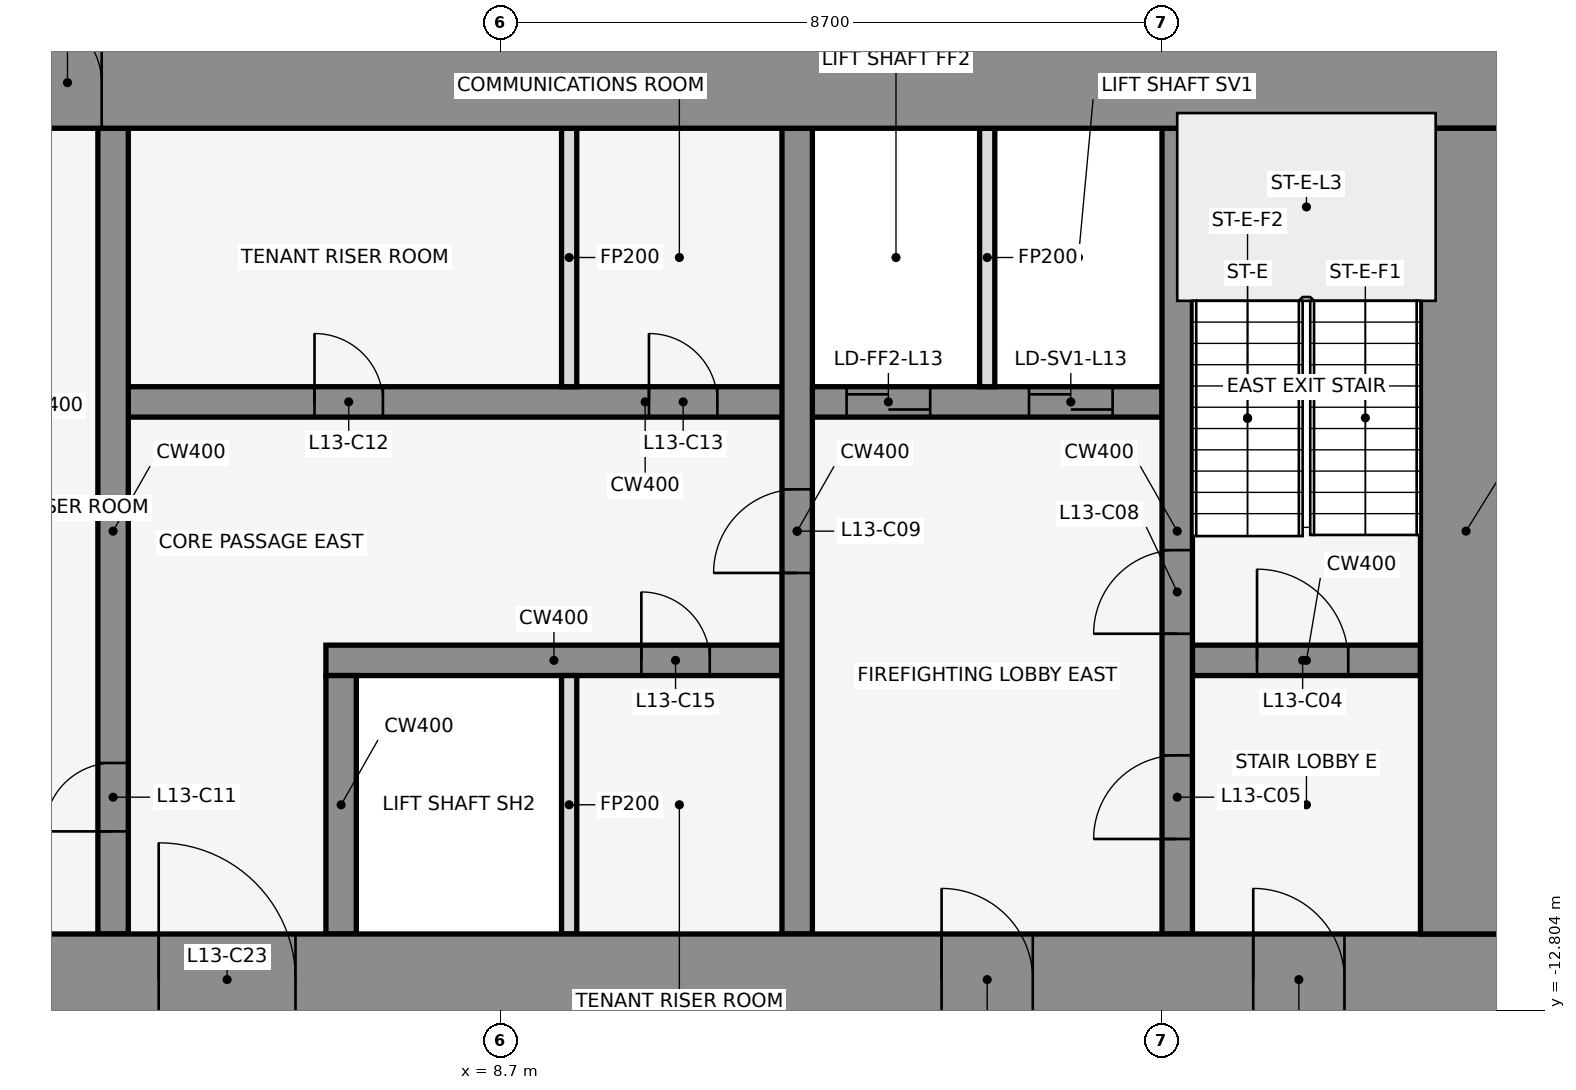
"""IFC4 building model, lengths in metres.
Left out: names, types, materials, properties, quantities, classifications, styles, units other than length and angle.
Written with IfcOpenShell. Run it as: python <this file> out.ifc"""

import sys

from ifc_helpers import new_model, si_unit, direction, frame, frame_2d, origin, place, context, subcontext, project, spatial, rectangle, extrude, element, fill, save


model = new_model("IFC4")
c1 = context("Model", 3, precision=1e-05, world=origin(), true_north=direction((0.0, 1.0)))
c2 = subcontext(c1, "Body", "Model", "MODEL_VIEW")
j1 = project(units=[si_unit("LENGTHUNIT", "METRE"), si_unit("PLANEANGLEUNIT", "RADIAN")], contexts=[c1])
p1 = place(None, origin())
s1 = spatial("IfcSite", under=j1, at=p1, CompositionType="ELEMENT")
p2 = place(p1, origin())
s2 = spatial("IfcBuilding", under=s1, at=p2, CompositionType="ELEMENT")
p3 = place(p2, frame((0.0, 0.0, 66.5)))
s3 = spatial("IfcBuildingStorey", under=s2, at=p3, CompositionType="ELEMENT", Elevation=66.5)
p4 = place(p3, frame((16.432, -0.105, 0.0), z_axis=(0.0, 0.0, 1.0), x_axis=(-0.83981312244, 0.542875602121, 0.0)))
e1 = element("IfcWall", 1, at=p4, inside=s3, PredefinedType="STANDARD", context=c2, shape_type="SweptSolid", body=[
    extrude(rectangle(XDim=2.183, YDim=0.25, at=frame_2d((1.091, 0.0))), origin(), (0.0, 0.0, 1.0), 4.35),
])
p5 = place(p3, frame((6.4, -8.2, 0.0), z_axis=(0.0, 0.0, 1.0), x_axis=(1.0, 0.0, 0.0)))
e2 = element("IfcWall", 2, at=p5, inside=s3, PredefinedType="SHEAR", context=c2, shape_type="SweptSolid", body=[
    extrude(rectangle(XDim=6.0, YDim=0.4, at=frame_2d((3.0, 0.0))), origin(), (0.0, 0.0, 1.0), 4.5),
])
p6 = place(p5, frame((4.15, 0.0, 0.0)))
e3 = element("IfcOpeningElement", 3, at=p6, cuts=e2, PredefinedType="OPENING", context=c2, shape_type="SweptSolid", body=[
    extrude(rectangle(XDim=0.9, YDim=2.1, at=frame_2d((0.45, 1.05))), frame((0.0, 0.212, 0.0), z_axis=(0.0, -1.0, 0.0), x_axis=(1.0, 0.0, 0.0)), (0.0, 0.0, 1.0), 0.424),
])
p7 = place(p3, frame((17.8, -8.2, 0.0), z_axis=(0.0, 0.0, 1.0), x_axis=(1.0, 0.0, 0.0)))
e4 = element("IfcWall", 4, at=p7, inside=s3, PredefinedType="SHEAR", context=c2, shape_type="SweptSolid", body=[
    extrude(rectangle(XDim=3.0, YDim=0.4, at=frame_2d((1.5, 0.0))), origin(), (0.0, 0.0, 1.0), 4.5),
])
p8 = place(p7, frame((0.85, 0.0, 0.0)))
e5 = element("IfcOpeningElement", 5, at=p8, cuts=e4, PredefinedType="OPENING", context=c2, shape_type="SweptSolid", body=[
    extrude(rectangle(XDim=1.2, YDim=2.1, at=frame_2d((0.6, 1.05))), frame((0.0, 0.212, 0.0), z_axis=(0.0, -1.0, 0.0), x_axis=(1.0, 0.0, 0.0)), (0.0, 0.0, 1.0), 0.424),
])
p9 = place(p3, frame((3.8, -4.8, 0.0), z_axis=(0.0, 0.0, 1.0), x_axis=(1.0, 0.0, 0.0)))
e6 = element("IfcWall", 6, at=p9, inside=s3, PredefinedType="SHEAR", context=c2, shape_type="SweptSolid", body=[
    extrude(rectangle(XDim=13.6, YDim=0.4, at=frame_2d((6.8, 0.0))), origin(), (0.0, 0.0, 1.0), 4.5),
])
p10 = place(p9, frame((9.45, 0.0, 0.0)))
e7 = element("IfcOpeningElement", 7, at=p10, cuts=e6, PredefinedType="OPENING", context=c2, shape_type="SweptSolid", body=[
    extrude(rectangle(XDim=1.1, YDim=2.1, at=frame_2d((0.55, 1.05))), frame((0.0, 0.212, 0.0), z_axis=(0.0, -1.0, 0.0), x_axis=(1.0, 0.0, 0.0)), (0.0, 0.0, 1.0), 0.424),
])
p11 = place(p9, frame((11.85, 0.0, 0.0)))
e8 = element("IfcOpeningElement", 8, at=p11, cuts=e6, PredefinedType="OPENING", context=c2, shape_type="SweptSolid", body=[
    extrude(rectangle(XDim=1.1, YDim=2.1, at=frame_2d((0.55, 1.05))), frame((0.0, 0.212, 0.0), z_axis=(0.0, -1.0, 0.0), x_axis=(1.0, 0.0, 0.0)), (0.0, 0.0, 1.0), 0.424),
])
p12 = place(p9, frame((2.45, 0.0, 0.0)))
e9 = element("IfcOpeningElement", 9, at=p12, cuts=e6, PredefinedType="OPENING", context=c2, shape_type="SweptSolid", body=[
    extrude(rectangle(XDim=0.9, YDim=2.1, at=frame_2d((0.45, 1.05))), frame((0.0, 0.212, 0.0), z_axis=(0.0, -1.0, 0.0), x_axis=(1.0, 0.0, 0.0)), (0.0, 0.0, 1.0), 0.424),
])
p13 = place(p9, frame((6.85, 0.0, 0.0)))
e10 = element("IfcOpeningElement", 10, at=p13, cuts=e6, PredefinedType="OPENING", context=c2, shape_type="SweptSolid", body=[
    extrude(rectangle(XDim=0.9, YDim=2.1, at=frame_2d((0.45, 1.05))), frame((0.0, 0.212, 0.0), z_axis=(0.0, -1.0, 0.0), x_axis=(1.0, 0.0, 0.0)), (0.0, 0.0, 1.0), 0.424),
])
p14 = place(p3, frame((3.6, -11.8, 0.0), z_axis=(0.0, 0.0, 1.0), x_axis=(0.0, 1.0, 0.0)))
e11 = element("IfcWall", 11, at=p14, inside=s3, PredefinedType="SHEAR", context=c2, shape_type="SweptSolid", body=[
    extrude(rectangle(XDim=10.6, YDim=0.4, at=frame_2d((5.3, 0.0))), origin(), (0.0, 0.0, 1.0), 4.5),
])
p15 = place(p14, frame((1.35, 0.0, 0.0)))
e12 = element("IfcOpeningElement", 12, at=p15, cuts=e11, PredefinedType="OPENING", context=c2, shape_type="SweptSolid", body=[
    extrude(rectangle(XDim=0.9, YDim=2.1, at=frame_2d((0.45, 1.05))), frame((0.0, 0.212, 0.0), z_axis=(0.0, -1.0, 0.0), x_axis=(1.0, 0.0, 0.0)), (0.0, 0.0, 1.0), 0.424),
])
p16 = place(p3, frame((6.6, -11.8, 0.0), z_axis=(0.0, 0.0, 1.0), x_axis=(0.0, 1.0, 0.0)))
e13 = element("IfcWall", 13, at=p16, inside=s3, PredefinedType="SHEAR", context=c2, shape_type="SweptSolid", body=[
    extrude(rectangle(XDim=3.4, YDim=0.4, at=frame_2d((1.7, 0.0))), origin(), (0.0, 0.0, 1.0), 4.5),
])
for number, where, z_axis, x_axis in (
    (14, (9.6, -11.8, 0.0), (0.0, 0.0, 1.0), (0.0, 1.0, 0.0)),
    (15, (9.6, -4.6, 0.0), (0.0, 0.0, 1.0), (0.0, 1.0, 0.0)),
):
    element("IfcWall", number, at=place(p3, frame(where, z_axis=z_axis, x_axis=x_axis)), inside=s3, PredefinedType="PARTITIONING", context=c2, shape_type="SweptSolid", body=[
        extrude(rectangle(XDim=3.4, YDim=0.2, at=frame_2d((1.7, 0.0))), origin(), (0.0, 0.0, 1.0), 3.418),
    ])
p17 = place(p3, frame((12.6, -11.8, 0.0), z_axis=(0.0, 0.0, 1.0), x_axis=(0.0, 1.0, 0.0)))
e16 = element("IfcWall", 16, at=p17, inside=s3, PredefinedType="SHEAR", context=c2, shape_type="SweptSolid", body=[
    extrude(rectangle(XDim=10.6, YDim=0.4, at=frame_2d((5.3, 0.0))), origin(), (0.0, 0.0, 1.0), 4.5),
])
p18 = place(p17, frame((4.75, 0.0, 0.0)))
e17 = element("IfcOpeningElement", 17, at=p18, cuts=e16, PredefinedType="OPENING", context=c2, shape_type="SweptSolid", body=[
    extrude(rectangle(XDim=1.1, YDim=2.1, at=frame_2d((0.55, 1.05))), frame((0.0, 0.212, 0.0), z_axis=(0.0, -1.0, 0.0), x_axis=(1.0, 0.0, 0.0)), (0.0, 0.0, 1.0), 0.424),
])
p19 = place(p3, frame((15.1, -4.6, 0.0), z_axis=(0.0, 0.0, 1.0), x_axis=(0.0, 1.0, 0.0)))
e18 = element("IfcWall", 18, at=p19, inside=s3, PredefinedType="PARTITIONING", context=c2, shape_type="SweptSolid", body=[
    extrude(rectangle(XDim=3.4, YDim=0.2, at=frame_2d((1.7, 0.0))), origin(), (0.0, 0.0, 1.0), 3.418),
])
p20 = place(p3, frame((17.6, -11.8, 0.0), z_axis=(0.0, 0.0, 1.0), x_axis=(0.0, 1.0, 0.0)))
e19 = element("IfcWall", 19, at=p20, inside=s3, PredefinedType="SHEAR", context=c2, shape_type="SweptSolid", body=[
    extrude(rectangle(XDim=10.6, YDim=0.4, at=frame_2d((5.3, 0.0))), origin(), (0.0, 0.0, 1.0), 4.5),
])
p21 = place(p20, frame((1.25, 0.0, 0.0)))
e20 = element("IfcOpeningElement", 20, at=p21, cuts=e19, PredefinedType="OPENING", context=c2, shape_type="SweptSolid", body=[
    extrude(rectangle(XDim=1.1, YDim=2.1, at=frame_2d((0.55, 1.05))), frame((0.0, 0.212, 0.0), z_axis=(0.0, -1.0, 0.0), x_axis=(1.0, 0.0, 0.0)), (0.0, 0.0, 1.0), 0.424),
])
p22 = place(p20, frame((3.95, 0.0, 0.0)))
e21 = element("IfcOpeningElement", 21, at=p22, cuts=e19, PredefinedType="OPENING", context=c2, shape_type="SweptSolid", body=[
    extrude(rectangle(XDim=1.1, YDim=2.1, at=frame_2d((0.55, 1.05))), frame((0.0, 0.212, 0.0), z_axis=(0.0, -1.0, 0.0), x_axis=(1.0, 0.0, 0.0)), (0.0, 0.0, 1.0), 0.424),
])
p23 = place(p3, frame((-22.0, -0.6, 0.0), z_axis=(0.0, 0.0, 1.0), x_axis=(1.0, 0.0, 0.0)))
e22 = element("IfcWall", 22, at=p23, inside=s3, PredefinedType="SHEAR", context=c2, shape_type="SweptSolid", body=[
    extrude(rectangle(XDim=44.0, YDim=1.2, at=frame_2d((22.0, 0.0))), origin(), (0.0, 0.0, 1.0), 4.5),
])
p24 = place(p23, frame((18.55, 0.0, 0.0)))
e23 = element("IfcOpeningElement", 23, at=p24, cuts=e22, PredefinedType="OPENING", context=c2, shape_type="SweptSolid", body=[
    extrude(rectangle(XDim=0.9, YDim=2.1, at=frame_2d((0.45, 1.05))), frame((0.0, 0.612, 0.0), z_axis=(0.0, -1.0, 0.0), x_axis=(1.0, 0.0, 0.0)), (0.0, 0.0, 1.0), 1.224),
])
p25 = place(p23, frame((24.55, 0.0, 0.0)))
e24 = element("IfcOpeningElement", 24, at=p25, cuts=e22, PredefinedType="OPENING", context=c2, shape_type="SweptSolid", body=[
    extrude(rectangle(XDim=0.9, YDim=2.1, at=frame_2d((0.45, 1.05))), frame((0.0, 0.612, 0.0), z_axis=(0.0, -1.0, 0.0), x_axis=(1.0, 0.0, 0.0)), (0.0, 0.0, 1.0), 1.224),
])
p26 = place(p3, frame((-22.0, -12.4, 0.0), z_axis=(0.0, 0.0, 1.0), x_axis=(1.0, 0.0, 0.0)))
e25 = element("IfcWall", 25, at=p26, inside=s3, PredefinedType="SHEAR", context=c2, shape_type="SweptSolid", body=[
    extrude(rectangle(XDim=44.0, YDim=1.2, at=frame_2d((22.0, 0.0))), origin(), (0.0, 0.0, 1.0), 4.5),
])
p27 = place(p26, frame((2.2, 0.0, 0.0)))
e26 = element("IfcOpeningElement", 26, at=p27, cuts=e25, PredefinedType="OPENING", context=c2, shape_type="SweptSolid", body=[
    extrude(rectangle(XDim=1.2, YDim=2.1, at=frame_2d((0.6, 1.05))), frame((0.0, 0.612, 0.0), z_axis=(0.0, -1.0, 0.0), x_axis=(1.0, 0.0, 0.0)), (0.0, 0.0, 1.0), 1.224),
])
p28 = place(p26, frame((21.4, 0.0, 0.0)))
e27 = element("IfcOpeningElement", 27, at=p28, cuts=e25, PredefinedType="OPENING", context=c2, shape_type="SweptSolid", body=[
    extrude(rectangle(XDim=1.2, YDim=2.1, at=frame_2d((0.6, 1.05))), frame((0.0, 0.612, 0.0), z_axis=(0.0, -1.0, 0.0), x_axis=(1.0, 0.0, 0.0)), (0.0, 0.0, 1.0), 1.224),
])
p29 = place(p26, frame((40.6, 0.0, 0.0)))
e28 = element("IfcOpeningElement", 28, at=p29, cuts=e25, PredefinedType="OPENING", context=c2, shape_type="SweptSolid", body=[
    extrude(rectangle(XDim=1.2, YDim=2.1, at=frame_2d((0.6, 1.05))), frame((0.0, 0.612, 0.0), z_axis=(0.0, -1.0, 0.0), x_axis=(1.0, 0.0, 0.0)), (0.0, 0.0, 1.0), 1.224),
])
p30 = place(p26, frame((16.0, 0.0, 0.0)))
e29 = element("IfcOpeningElement", 29, at=p30, cuts=e25, PredefinedType="OPENING", context=c2, shape_type="SweptSolid", body=[
    extrude(rectangle(XDim=1.8, YDim=2.1, at=frame_2d((0.9, 1.05))), frame((0.0, 0.612, 0.0), z_axis=(0.0, -1.0, 0.0), x_axis=(1.0, 0.0, 0.0)), (0.0, 0.0, 1.0), 1.224),
])
p31 = place(p26, frame((6.3, 0.0, 0.0)))
e30 = element("IfcOpeningElement", 30, at=p31, cuts=e25, PredefinedType="OPENING", context=c2, shape_type="SweptSolid", body=[
    extrude(rectangle(XDim=1.2, YDim=2.1, at=frame_2d((0.6, 1.05))), frame((0.0, 0.612, 0.0), z_axis=(0.0, -1.0, 0.0), x_axis=(1.0, 0.0, 0.0)), (0.0, 0.0, 1.0), 1.224),
])
p32 = place(p26, frame((26.2, 0.0, 0.0)))
e31 = element("IfcOpeningElement", 31, at=p32, cuts=e25, PredefinedType="OPENING", context=c2, shape_type="SweptSolid", body=[
    extrude(rectangle(XDim=1.8, YDim=2.1, at=frame_2d((0.9, 1.05))), frame((0.0, 0.612, 0.0), z_axis=(0.0, -1.0, 0.0), x_axis=(1.0, 0.0, 0.0)), (0.0, 0.0, 1.0), 1.224),
])
p33 = place(p26, frame((36.5, 0.0, 0.0)))
e32 = element("IfcOpeningElement", 32, at=p33, cuts=e25, PredefinedType="OPENING", context=c2, shape_type="SweptSolid", body=[
    extrude(rectangle(XDim=1.2, YDim=2.1, at=frame_2d((0.6, 1.05))), frame((0.0, 0.612, 0.0), z_axis=(0.0, -1.0, 0.0), x_axis=(1.0, 0.0, 0.0)), (0.0, 0.0, 1.0), 1.224),
])
p34 = place(p3, frame((21.4, -11.8, 0.0), z_axis=(0.0, 0.0, 1.0), x_axis=(0.0, 1.0, 0.0)))
e33 = element("IfcWall", 33, at=p34, inside=s3, PredefinedType="SHEAR", context=c2, shape_type="SweptSolid", body=[
    extrude(rectangle(XDim=10.6, YDim=1.2, at=frame_2d((5.3, 0.0))), origin(), (0.0, 0.0, 1.0), 4.5),
])
p35 = place(p8, origin())
e34 = element("IfcDoor", 34, at=p35, inside=s3, OperationType="SINGLE_SWING_RIGHT", PredefinedType="DOOR", context=c2, shape_type="SweptSolid", body=[
    extrude(rectangle(XDim=1.2, YDim=2.1, at=frame_2d((0.6, 1.05))), frame((0.0, 0.025, 0.0), z_axis=(0.0, -1.0, 0.0), x_axis=(1.0, 0.0, 0.0)), (0.0, 0.0, 1.0), 0.05),
])
fill(e5, e34)
p36 = place(p21, origin())
e35 = element("IfcDoor", 35, at=p36, inside=s3, OperationType="SINGLE_SWING_LEFT", PredefinedType="DOOR", context=c2, shape_type="SweptSolid", body=[
    extrude(rectangle(XDim=1.1, YDim=2.1, at=frame_2d((0.55, 1.05))), frame((0.0, 0.025, 0.0), z_axis=(0.0, -1.0, 0.0), x_axis=(1.0, 0.0, 0.0)), (0.0, 0.0, 1.0), 0.05),
])
fill(e20, e35)
p37 = place(p10, origin())
e36 = element("IfcDoor", 36, at=p37, inside=s3, OperationType="DOUBLE_DOOR_SLIDING", PredefinedType="DOOR", context=c2, shape_type="SweptSolid", body=[
    extrude(rectangle(XDim=1.1, YDim=2.1, at=frame_2d((0.55, 1.05))), frame((0.0, 0.025, 0.0), z_axis=(0.0, -1.0, 0.0), x_axis=(1.0, 0.0, 0.0)), (0.0, 0.0, 1.0), 0.05),
])
fill(e7, e36)
p38 = place(p11, origin())
e37 = element("IfcDoor", 37, at=p38, inside=s3, OperationType="DOUBLE_DOOR_SLIDING", PredefinedType="DOOR", context=c2, shape_type="SweptSolid", body=[
    extrude(rectangle(XDim=1.1, YDim=2.1, at=frame_2d((0.55, 1.05))), frame((0.0, 0.025, 0.0), z_axis=(0.0, -1.0, 0.0), x_axis=(1.0, 0.0, 0.0)), (0.0, 0.0, 1.0), 0.05),
])
fill(e8, e37)
p39 = place(p22, origin())
e38 = element("IfcDoor", 38, at=p39, inside=s3, OperationType="SINGLE_SWING_RIGHT", PredefinedType="DOOR", context=c2, shape_type="SweptSolid", body=[
    extrude(rectangle(XDim=1.1, YDim=2.1, at=frame_2d((0.55, 1.05))), frame((0.0, 0.025, 0.0), z_axis=(0.0, -1.0, 0.0), x_axis=(1.0, 0.0, 0.0)), (0.0, 0.0, 1.0), 0.05),
])
fill(e21, e38)
p40 = place(p18, frame((1.1, 0.0, 0.0), z_axis=(0.0, 0.0, 1.0), x_axis=(-1.0, 0.0, 0.0)))
e39 = element("IfcDoor", 39, at=p40, inside=s3, OperationType="SINGLE_SWING_RIGHT", PredefinedType="DOOR", context=c2, shape_type="SweptSolid", body=[
    extrude(rectangle(XDim=1.1, YDim=2.1, at=frame_2d((0.55, 1.05))), frame((0.0, 0.025, 0.0), z_axis=(0.0, -1.0, 0.0), x_axis=(1.0, 0.0, 0.0)), (0.0, 0.0, 1.0), 0.05),
])
fill(e17, e39)
p41 = place(p15, origin())
e40 = element("IfcDoor", 40, at=p41, inside=s3, OperationType="SINGLE_SWING_LEFT", PredefinedType="DOOR", context=c2, shape_type="SweptSolid", body=[
    extrude(rectangle(XDim=0.9, YDim=2.1, at=frame_2d((0.45, 1.05))), frame((0.0, 0.025, 0.0), z_axis=(0.0, -1.0, 0.0), x_axis=(1.0, 0.0, 0.0)), (0.0, 0.0, 1.0), 0.05),
])
fill(e12, e40)
p42 = place(p12, origin())
e41 = element("IfcDoor", 41, at=p42, inside=s3, OperationType="SINGLE_SWING_RIGHT", PredefinedType="DOOR", context=c2, shape_type="SweptSolid", body=[
    extrude(rectangle(XDim=0.9, YDim=2.1, at=frame_2d((0.45, 1.05))), frame((0.0, 0.025, 0.0), z_axis=(0.0, -1.0, 0.0), x_axis=(1.0, 0.0, 0.0)), (0.0, 0.0, 1.0), 0.05),
])
fill(e9, e41)
p43 = place(p13, origin())
e42 = element("IfcDoor", 42, at=p43, inside=s3, OperationType="SINGLE_SWING_LEFT", PredefinedType="DOOR", context=c2, shape_type="SweptSolid", body=[
    extrude(rectangle(XDim=0.9, YDim=2.1, at=frame_2d((0.45, 1.05))), frame((0.0, 0.025, 0.0), z_axis=(0.0, -1.0, 0.0), x_axis=(1.0, 0.0, 0.0)), (0.0, 0.0, 1.0), 0.05),
])
fill(e10, e42)
p44 = place(p6, frame((0.9, 0.0, 0.0), z_axis=(0.0, 0.0, 1.0), x_axis=(-1.0, 0.0, 0.0)))
e43 = element("IfcDoor", 43, at=p44, inside=s3, OperationType="SINGLE_SWING_RIGHT", PredefinedType="DOOR", context=c2, shape_type="SweptSolid", body=[
    extrude(rectangle(XDim=0.9, YDim=2.1, at=frame_2d((0.45, 1.05))), frame((0.0, 0.025, 0.0), z_axis=(0.0, -1.0, 0.0), x_axis=(1.0, 0.0, 0.0)), (0.0, 0.0, 1.0), 0.05),
])
fill(e3, e43)
p45 = place(p25, origin())
e44 = element("IfcDoor", 44, at=p45, inside=s3, OperationType="SINGLE_SWING_LEFT", PredefinedType="DOOR", context=c2, shape_type="SweptSolid", body=[
    extrude(rectangle(XDim=0.9, YDim=2.1, at=frame_2d((0.45, 1.05))), frame((0.0, 0.025, 0.0), z_axis=(0.0, -1.0, 0.0), x_axis=(1.0, 0.0, 0.0)), (0.0, 0.0, 1.0), 0.05),
])
fill(e24, e44)
p46 = place(p29, frame((1.2, 0.0, 0.0), z_axis=(0.0, 0.0, 1.0), x_axis=(-1.0, 0.0, 0.0)))
e45 = element("IfcDoor", 45, at=p46, inside=s3, OperationType="SINGLE_SWING_RIGHT", PredefinedType="DOOR", context=c2, shape_type="SweptSolid", body=[
    extrude(rectangle(XDim=1.2, YDim=2.1, at=frame_2d((0.6, 1.05))), frame((0.0, 0.025, 0.0), z_axis=(0.0, -1.0, 0.0), x_axis=(1.0, 0.0, 0.0)), (0.0, 0.0, 1.0), 0.05),
])
fill(e28, e45)
p47 = place(p32, origin())
e46 = element("IfcDoor", 46, at=p47, inside=s3, OperationType="SINGLE_SWING_LEFT", PredefinedType="DOOR", context=c2, shape_type="SweptSolid", body=[
    extrude(rectangle(XDim=1.8, YDim=2.1, at=frame_2d((0.9, 1.05))), frame((0.0, 0.025, 0.0), z_axis=(0.0, -1.0, 0.0), x_axis=(1.0, 0.0, 0.0)), (0.0, 0.0, 1.0), 0.05),
])
fill(e31, e46)
p48 = place(p33, frame((1.2, 0.0, 0.0), z_axis=(0.0, 0.0, 1.0), x_axis=(-1.0, 0.0, 0.0)))
e47 = element("IfcDoor", 47, at=p48, inside=s3, OperationType="SINGLE_SWING_RIGHT", PredefinedType="DOOR", context=c2, shape_type="SweptSolid", body=[
    extrude(rectangle(XDim=1.2, YDim=2.1, at=frame_2d((0.6, 1.05))), frame((0.0, 0.025, 0.0), z_axis=(0.0, -1.0, 0.0), x_axis=(1.0, 0.0, 0.0)), (0.0, 0.0, 1.0), 0.05),
])
fill(e32, e47)
save(model, sys.argv[1])
